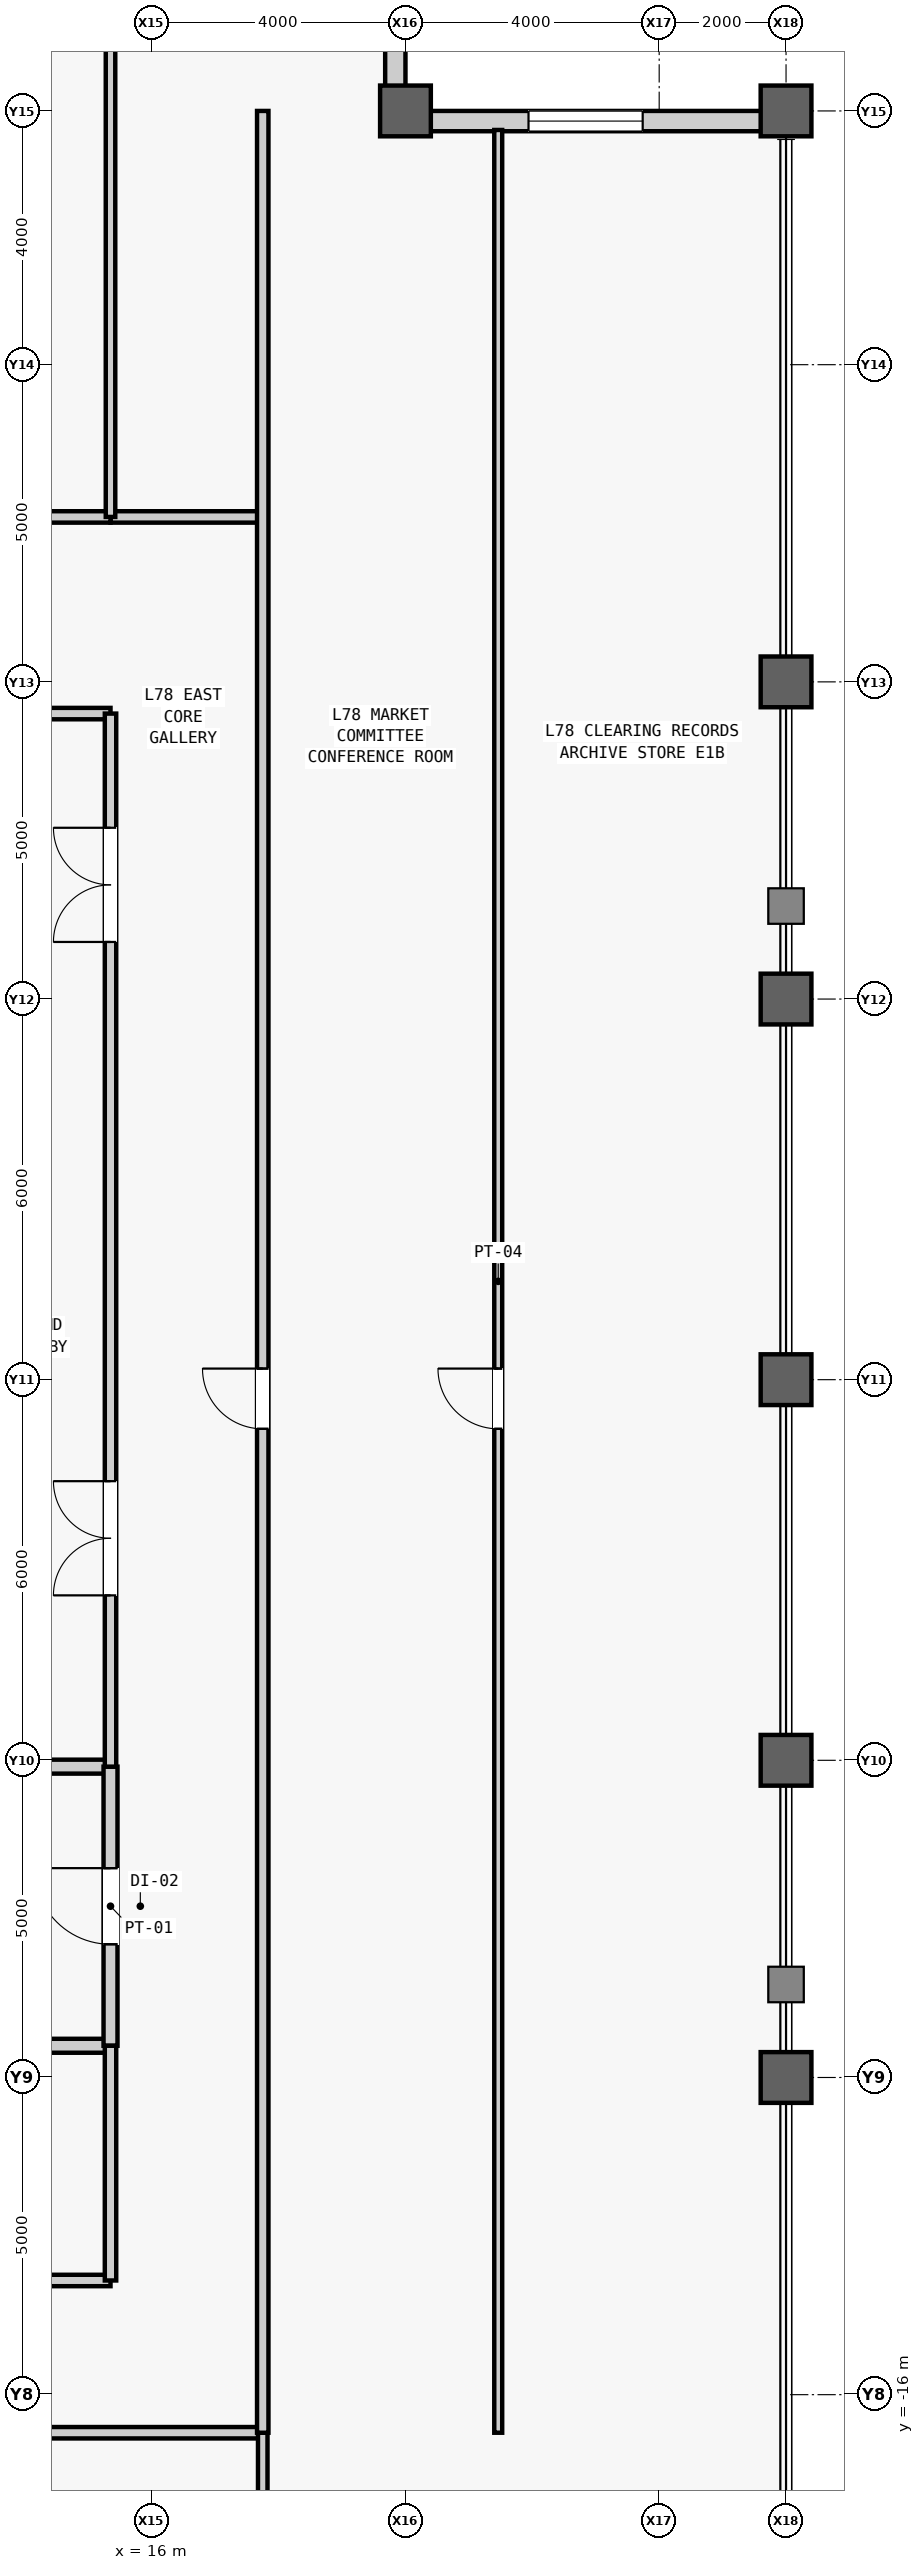
"""IFC4 building model, lengths in metres.
Left out: names, types, materials, properties, quantities, classifications, styles, units other than length and angle.
Written with IfcOpenShell. Run it as: python <this file> out.ifc"""

import sys

from ifc_helpers import new_model, si_unit, direction, frame, frame_2d, origin, origin_2d, place, context, subcontext, project, spatial, rectangle, hollow_rectangle, extrude, source, transform, mapped, element, fill, save


model = new_model("IFC4")
c1 = context("Model", 3, precision=1e-05, world=origin(), true_north=direction((0.0, 1.0)))
c2 = subcontext(c1, "Body", "Model", "MODEL_VIEW")
j1 = project(units=[si_unit("LENGTHUNIT", "METRE"), si_unit("PLANEANGLEUNIT", "RADIAN")], contexts=[c1])
p1 = place(None, origin())
s1 = spatial("IfcSite", under=j1, at=p1, CompositionType="ELEMENT")
p2 = place(p1, origin())
s2 = spatial("IfcBuilding", under=s1, at=p2, CompositionType="ELEMENT")
p3 = place(p2, frame((0.0, 0.0, 330.3)))
s3 = spatial("IfcBuildingStorey", under=s2, at=p3, CompositionType="ELEMENT", Elevation=330.3)
m1 = source(origin(), c2, "Body", "SweptSolid", [
    extrude(hollow_rectangle(XDim=0.8, YDim=0.8, WallThickness=0.045, at=origin_2d()), origin(), (0.0, 0.0, 1.0), 4.0),
])
for number, where, z_axis, x_axis in (
    (1, (20.0, 20.0, 0.0), (0.0, 0.0, 1.0), (1.0, 0.0, 0.0)),
    (2, (26.0, -11.0, 0.0), (0.0, 0.0, 1.0), (1.0, 0.0, 0.0)),
    (3, (26.0, -6.0, 0.0), (0.0, 0.0, 1.0), (1.0, 0.0, 0.0)),
    (4, (26.0, 0.0, 0.0), (0.0, 0.0, 1.0), (1.0, 0.0, 0.0)),
    (5, (26.0, 6.0, 0.0), (0.0, 0.0, 1.0), (1.0, 0.0, 0.0)),
    (6, (26.0, 11.0, 0.0), (0.0, 0.0, 1.0), (1.0, 0.0, 0.0)),
    (7, (26.0, 20.0, 0.0), (0.0, 0.0, 1.0), (1.0, 0.0, 0.0)),
):
    element("IfcColumn", number, at=place(p3, frame(where, z_axis=z_axis, x_axis=x_axis)), inside=s3, PredefinedType="COLUMN", context=c2, shape_type="MappedRepresentation", body=[
        mapped(m1, transform((0.0, 0.0, 0.0), scale=1.0)),
    ])
m2 = source(origin(), c2, "Body", "SweptSolid", [
    extrude(rectangle(XDim=5.68, YDim=0.32, at=frame_2d((2.84, 0.0))), origin(), (0.0, 0.0, 1.0), 3.191),
])
p4 = place(p3, frame((20.0, 19.84, 0.0), z_axis=(0.0, 0.0, 1.0), x_axis=(1.0, 0.0, 0.0)))
e8 = element("IfcWall", 8, at=p4, inside=s3, PredefinedType="STANDARD", context=c2, shape_type="MappedRepresentation", body=[
    mapped(m2, transform((0.0, 0.0, 0.0), scale=1.0)),
])
m3 = source(origin(), c2, "Body", "SweptSolid", [
    extrude(rectangle(XDim=1.8, YDim=2.4, at=frame_2d((0.9, 1.2))), frame((0.0, 0.17, 0.0), z_axis=(0.0, -1.0, 0.0), x_axis=(1.0, 0.0, 0.0)), (0.0, 0.0, 1.0), 0.34),
])
p5 = place(p4, frame((1.94, 0.0, 0.5)))
e9 = element("IfcOpeningElement", 9, at=p5, cuts=e8, PredefinedType="OPENING", context=c2, shape_type="MappedRepresentation", body=[
    mapped(m3, transform((0.0, 0.0, 0.0), scale=1.0)),
])
p6 = place(p3, frame((19.84, 20.0, 0.0), z_axis=(0.0, 0.0, 1.0), x_axis=(0.0, 1.0, 0.0)))
e10 = element("IfcWall", 10, at=p6, inside=s3, PredefinedType="STANDARD", context=c2, shape_type="MappedRepresentation", body=[
    mapped(m2, transform((0.0, 0.0, 0.0), scale=1.0)),
])
p7 = place(p6, frame((1.94, 0.0, 0.5)))
e11 = element("IfcOpeningElement", 11, at=p7, cuts=e10, PredefinedType="OPENING", context=c2, shape_type="MappedRepresentation", body=[
    mapped(m3, transform((0.0, 0.0, 0.0), scale=1.0)),
])
m4 = source(origin(), c2, "Body", "SweptSolid", [
    extrude(rectangle(XDim=4.05, YDim=0.22, at=frame_2d((2.025, 0.0))), origin(), (0.0, 0.0, 1.0), 3.74),
])
p8 = place(p3, frame((11.3, -10.5, 0.0), z_axis=(0.0, 0.0, 1.0), x_axis=(1.0, 0.0, 0.0)))
e12 = element("IfcWall", 12, at=p8, inside=s3, PredefinedType="PARTITIONING", context=c2, shape_type="MappedRepresentation", body=[
    mapped(m4, transform((0.0, 0.0, 0.0), scale=1.0)),
])
m5 = source(origin(), c2, "Body", "SweptSolid", [
    extrude(rectangle(XDim=4.05, YDim=0.22, at=frame_2d((2.025, 0.0))), origin(), (0.0, 0.0, 1.0), 3.124),
])
p9 = place(p3, frame((11.3, -6.1, 0.0), z_axis=(0.0, 0.0, 1.0), x_axis=(1.0, 0.0, 0.0)))
e13 = element("IfcWall", 13, at=p9, inside=s3, PredefinedType="PARTITIONING", context=c2, shape_type="MappedRepresentation", body=[
    mapped(m5, transform((0.0, 0.0, 0.0), scale=1.0)),
])
m6 = source(origin(), c2, "Body", "SweptSolid", [
    extrude(rectangle(XDim=4.4, YDim=0.22, at=frame_2d((2.2, 0.0))), origin(), (0.0, 0.0, 1.0), 3.74),
])
p10 = place(p3, frame((15.35, -10.5, 0.0), z_axis=(0.0, 0.0, 1.0), x_axis=(0.0, 1.0, 0.0)))
e14 = element("IfcWall", 14, at=p10, inside=s3, PredefinedType="PARTITIONING", context=c2, shape_type="MappedRepresentation", body=[
    mapped(m6, transform((0.0, 0.0, 0.0), scale=1.0)),
])
m7 = source(origin(), c2, "Body", "SweptSolid", [
    extrude(rectangle(XDim=1.2, YDim=2.2, at=frame_2d((0.6, 1.1))), frame((0.0, 0.12, 0.0), z_axis=(0.0, -1.0, 0.0), x_axis=(1.0, 0.0, 0.0)), (0.0, 0.0, 1.0), 0.24),
])
p11 = place(p10, frame((1.6, 0.0, 0.0)))
e15 = element("IfcOpeningElement", 15, at=p11, cuts=e14, PredefinedType="OPENING", context=c2, shape_type="MappedRepresentation", body=[
    mapped(m7, transform((0.0, 0.0, 0.0), scale=1.0)),
])
m8 = source(origin(), c2, "Body", "SweptSolid", [
    extrude(rectangle(XDim=4.05, YDim=0.18, at=frame_2d((2.025, 0.0))), origin(), (0.0, 0.0, 1.0), 3.74),
])
p12 = place(p3, frame((11.3, 10.5, 0.0), z_axis=(0.0, 0.0, 1.0), x_axis=(1.0, 0.0, 0.0)))
e16 = element("IfcWall", 16, at=p12, inside=s3, PredefinedType="PARTITIONING", context=c2, shape_type="MappedRepresentation", body=[
    mapped(m8, transform((0.0, 0.0, 0.0), scale=1.0)),
])
m9 = source(origin(), c2, "Body", "SweptSolid", [
    extrude(rectangle(XDim=16.6, YDim=0.18, at=frame_2d((8.3, 0.0))), origin(), (0.0, 0.0, 1.0), 3.74),
])
p13 = place(p3, frame((15.35, -6.1, 0.0), z_axis=(0.0, 0.0, 1.0), x_axis=(0.0, 1.0, 0.0)))
e17 = element("IfcWall", 17, at=p13, inside=s3, PredefinedType="PARTITIONING", context=c2, shape_type="MappedRepresentation", body=[
    mapped(m9, transform((0.0, 0.0, 0.0), scale=1.0)),
])
m10 = source(origin(), c2, "Body", "SweptSolid", [
    extrude(rectangle(XDim=1.8, YDim=2.25, at=frame_2d((0.9, 1.125))), frame((0.0, 0.1, 0.0), z_axis=(0.0, -1.0, 0.0), x_axis=(1.0, 0.0, 0.0)), (0.0, 0.0, 1.0), 0.2),
])
p14 = place(p13, frame((2.7, 0.0, 0.0)))
e18 = element("IfcOpeningElement", 18, at=p14, cuts=e17, PredefinedType="OPENING", context=c2, shape_type="MappedRepresentation", body=[
    mapped(m10, transform((0.0, 0.0, 0.0), scale=1.0)),
])
p15 = place(p13, frame((13.0, 0.0, 0.0)))
e19 = element("IfcOpeningElement", 19, at=p15, cuts=e17, PredefinedType="OPENING", context=c2, shape_type="MappedRepresentation", body=[
    mapped(m10, transform((0.0, 0.0, 0.0), scale=1.0)),
])
m11 = source(origin(), c2, "Body", "SweptSolid", [
    extrude(rectangle(XDim=14.05, YDim=0.18, at=frame_2d((7.025, 0.0))), origin(), (0.0, 0.0, 1.0), 3.74),
])
p16 = place(p3, frame((1.3, -14.2, 0.0), z_axis=(0.0, 0.0, 1.0), x_axis=(1.0, 0.0, 0.0)))
e20 = element("IfcWall", 20, at=p16, inside=s3, PredefinedType="PARTITIONING", context=c2, shape_type="MappedRepresentation", body=[
    mapped(m11, transform((0.0, 0.0, 0.0), scale=1.0)),
])
m12 = source(origin(), c2, "Body", "SweptSolid", [
    extrude(rectangle(XDim=0.9, YDim=2.15, at=frame_2d((0.45, 1.075))), frame((0.0, 0.1, 0.0), z_axis=(0.0, -1.0, 0.0), x_axis=(1.0, 0.0, 0.0)), (0.0, 0.0, 1.0), 0.2),
])
p17 = place(p16, frame((6.25, 0.0, 0.0)))
e21 = element("IfcOpeningElement", 21, at=p17, cuts=e20, PredefinedType="OPENING", context=c2, shape_type="MappedRepresentation", body=[
    mapped(m12, transform((0.0, 0.0, 0.0), scale=1.0)),
])
m13 = source(origin(), c2, "Body", "SweptSolid", [
    extrude(rectangle(XDim=3.7, YDim=0.18, at=frame_2d((1.85, 0.0))), origin(), (0.0, 0.0, 1.0), 3.74),
])
p18 = place(p3, frame((15.35, -14.2, 0.0), z_axis=(0.0, 0.0, 1.0), x_axis=(0.0, 1.0, 0.0)))
e22 = element("IfcWall", 22, at=p18, inside=s3, PredefinedType="PARTITIONING", context=c2, shape_type="MappedRepresentation", body=[
    mapped(m13, transform((0.0, 0.0, 0.0), scale=1.0)),
])
m14 = source(origin(), c2, "Body", "SweptSolid", [
    extrude(rectangle(XDim=2.4, YDim=0.18, at=frame_2d((1.2, 0.0))), origin(), (0.0, 0.0, 1.0), 3.74),
])
p19 = place(p3, frame((15.35, 13.6, 0.0), z_axis=(0.0, 0.0, 1.0), x_axis=(1.0, 0.0, 0.0)))
e23 = element("IfcWall", 23, at=p19, inside=s3, PredefinedType="PARTITIONING", context=c2, shape_type="MappedRepresentation", body=[
    mapped(m14, transform((0.0, 0.0, 0.0), scale=1.0)),
])
m15 = source(origin(), c2, "Body", "SweptSolid", [
    extrude(rectangle(XDim=36.3, YDim=0.18, at=frame_2d((18.15, 0.0))), origin(), (0.0, 0.0, 1.0), 3.74),
])
p20 = place(p3, frame((-18.55, -16.6, 0.0), z_axis=(0.0, 0.0, 1.0), x_axis=(1.0, 0.0, 0.0)))
e24 = element("IfcWall", 24, at=p20, inside=s3, PredefinedType="PARTITIONING", context=c2, shape_type="MappedRepresentation", body=[
    mapped(m15, transform((0.0, 0.0, 0.0), scale=1.0)),
])
m16 = source(origin(), c2, "Body", "SweptSolid", [
    extrude(rectangle(XDim=1.05, YDim=2.2, at=frame_2d((0.525, 1.1))), frame((0.0, 0.1, 0.0), z_axis=(0.0, -1.0, 0.0), x_axis=(1.0, 0.0, 0.0)), (0.0, 0.0, 1.0), 0.2),
])
p21 = place(p20, frame((3.605, 0.0, 0.0)))
e25 = element("IfcOpeningElement", 25, at=p21, cuts=e24, PredefinedType="OPENING", context=c2, shape_type="MappedRepresentation", body=[
    mapped(m16, transform((0.0, 0.0, 0.0), scale=1.0)),
])
p22 = place(p20, frame((11.454, 0.0, 0.0)))
e26 = element("IfcOpeningElement", 26, at=p22, cuts=e24, PredefinedType="OPENING", context=c2, shape_type="MappedRepresentation", body=[
    mapped(m16, transform((0.0, 0.0, 0.0), scale=1.0)),
])
p23 = place(p20, frame((21.255, 0.0, 0.0)))
e27 = element("IfcOpeningElement", 27, at=p23, cuts=e24, PredefinedType="OPENING", context=c2, shape_type="MappedRepresentation", body=[
    mapped(m16, transform((0.0, 0.0, 0.0), scale=1.0)),
])
p24 = place(p20, frame((30.531, 0.0, 0.0)))
e28 = element("IfcOpeningElement", 28, at=p24, cuts=e24, PredefinedType="OPENING", context=c2, shape_type="MappedRepresentation", body=[
    mapped(m16, transform((0.0, 0.0, 0.0), scale=1.0)),
])
m17 = source(origin(), c2, "Body", "SweptSolid", [
    extrude(rectangle(XDim=9.4, YDim=0.15, at=frame_2d((4.7, 0.0))), origin(), (0.0, 0.0, 1.0), 3.74),
])
p25 = place(p3, frame((17.75, -26.0, 0.0), z_axis=(0.0, 0.0, 1.0), x_axis=(0.0, 1.0, 0.0)))
e29 = element("IfcWall", 29, at=p25, inside=s3, PredefinedType="PARTITIONING", context=c2, shape_type="MappedRepresentation", body=[
    mapped(m17, transform((0.0, 0.0, 0.0), scale=1.0)),
])
m18 = source(origin(), c2, "Body", "SweptSolid", [
    extrude(rectangle(XDim=32.75, YDim=0.18, at=frame_2d((16.375, 0.0))), origin(), (0.0, 0.0, 1.0), 3.74),
])
p26 = place(p3, frame((-17.4, 13.6, 0.0), z_axis=(0.0, 0.0, 1.0), x_axis=(1.0, 0.0, 0.0)))
e30 = element("IfcWall", 30, at=p26, inside=s3, PredefinedType="PARTITIONING", context=c2, shape_type="MappedRepresentation", body=[
    mapped(m18, transform((0.0, 0.0, 0.0), scale=1.0)),
])
p27 = place(p26, frame((27.075, 0.0, 0.0)))
e31 = element("IfcOpeningElement", 31, at=p27, cuts=e30, PredefinedType="OPENING", context=c2, shape_type="MappedRepresentation", body=[
    mapped(m16, transform((0.0, 0.0, 0.0), scale=1.0)),
])
m19 = source(origin(), c2, "Body", "SweptSolid", [
    extrude(rectangle(XDim=12.4, YDim=0.15, at=frame_2d((6.2, 0.0))), origin(), (0.0, 0.0, 1.0), 3.74),
])
p28 = place(p3, frame((15.35, 13.6, 0.0), z_axis=(0.0, 0.0, 1.0), x_axis=(0.0, 1.0, 0.0)))
e32 = element("IfcWall", 32, at=p28, inside=s3, PredefinedType="PARTITIONING", context=c2, shape_type="MappedRepresentation", body=[
    mapped(m19, transform((0.0, 0.0, 0.0), scale=1.0)),
])
m20 = source(origin(), c2, "Body", "SweptSolid", [
    extrude(rectangle(XDim=36.3, YDim=0.125, at=frame_2d((18.15, 0.0))), origin(), (0.0, 0.0, 1.0), 3.74),
])
p29 = place(p3, frame((21.462, -16.6, 0.0), z_axis=(0.0, 0.0, 1.0), x_axis=(0.0, 1.0, 0.0)))
e33 = element("IfcWall", 33, at=p29, inside=s3, PredefinedType="PARTITIONING", context=c2, shape_type="MappedRepresentation", body=[
    mapped(m20, transform((0.0, 0.0, 0.0), scale=1.0)),
])
m21 = source(origin(), c2, "Body", "SweptSolid", [
    extrude(rectangle(XDim=0.95, YDim=2.15, at=frame_2d((0.475, 1.075))), frame((0.0, 0.073, 0.0), z_axis=(0.0, -1.0, 0.0), x_axis=(1.0, 0.0, 0.0)), (0.0, 0.0, 1.0), 0.145),
])
p30 = place(p29, frame((15.825, 0.0, 0.0)))
e34 = element("IfcOpeningElement", 34, at=p30, cuts=e33, PredefinedType="OPENING", context=c2, shape_type="MappedRepresentation", body=[
    mapped(m21, transform((0.0, 0.0, 0.0), scale=1.0)),
])
m22 = source(origin(), c2, "Body", "SweptSolid", [
    extrude(rectangle(XDim=36.6, YDim=0.18, at=frame_2d((18.3, 0.0))), origin(), (0.0, 0.0, 1.0), 3.74),
])
p31 = place(p3, frame((17.75, -16.6, 0.0), z_axis=(0.0, 0.0, 1.0), x_axis=(0.0, 1.0, 0.0)))
e35 = element("IfcWall", 35, at=p31, inside=s3, PredefinedType="PARTITIONING", context=c2, shape_type="MappedRepresentation", body=[
    mapped(m22, transform((0.0, 0.0, 0.0), scale=1.0)),
])
m23 = source(origin(), c2, "Body", "SweptSolid", [
    extrude(rectangle(XDim=0.95, YDim=2.15, at=frame_2d((0.475, 1.075))), frame((0.0, 0.1, 0.0), z_axis=(0.0, -1.0, 0.0), x_axis=(1.0, 0.0, 0.0)), (0.0, 0.0, 1.0), 0.2),
])
p32 = place(p31, frame((15.825, 0.0, 0.0)))
e36 = element("IfcOpeningElement", 36, at=p32, cuts=e35, PredefinedType="OPENING", context=c2, shape_type="MappedRepresentation", body=[
    mapped(m23, transform((0.0, 0.0, 0.0), scale=1.0)),
])
m24 = source(origin(), c2, "Body", "SweptSolid", [
    extrude(rectangle(XDim=1.8, YDim=2.4, at=frame_2d((0.9, 1.2))), frame((0.0, 0.03, 0.0), z_axis=(0.0, -1.0, 0.0), x_axis=(1.0, 0.0, 0.0)), (0.0, 0.0, 1.0), 0.06),
])
p33 = place(p5, origin())
e37 = element("IfcWindow", 37, at=p33, inside=s3, PartitioningType="SINGLE_PANEL", PredefinedType="WINDOW", context=c2, shape_type="MappedRepresentation", body=[
    mapped(m24, transform((0.0, 0.0, 0.0), scale=1.0)),
])
fill(e9, e37)
m25 = source(origin(), c2, "Body", "SweptSolid", [
    extrude(rectangle(XDim=1.2, YDim=2.2, at=frame_2d((0.6, 1.1))), frame((0.0, 0.025, 0.0), z_axis=(0.0, -1.0, 0.0), x_axis=(1.0, 0.0, 0.0)), (0.0, 0.0, 1.0), 0.05),
])
p34 = place(p11, origin())
e38 = element("IfcDoor", 38, at=p34, inside=s3, OperationType="SINGLE_SWING_RIGHT", PredefinedType="DOOR", context=c2, shape_type="MappedRepresentation", body=[
    mapped(m25, transform((0.0, 0.0, 0.0), scale=1.0)),
])
fill(e15, e38)
m26 = source(origin(), c2, "Body", "SweptSolid", [
    extrude(rectangle(XDim=1.8, YDim=2.25, at=frame_2d((0.9, 1.125))), frame((0.0, 0.025, 0.0), z_axis=(0.0, -1.0, 0.0), x_axis=(1.0, 0.0, 0.0)), (0.0, 0.0, 1.0), 0.05),
])
p35 = place(p14, origin())
e39 = element("IfcDoor", 39, at=p35, inside=s3, OperationType="SINGLE_SWING_RIGHT", PredefinedType="DOOR", context=c2, shape_type="MappedRepresentation", body=[
    mapped(m26, transform((0.0, 0.0, 0.0), scale=1.0)),
])
fill(e18, e39)
p36 = place(p15, origin())
e40 = element("IfcDoor", 40, at=p36, inside=s3, OperationType="SINGLE_SWING_LEFT", PredefinedType="DOOR", context=c2, shape_type="MappedRepresentation", body=[
    mapped(m26, transform((0.0, 0.0, 0.0), scale=1.0)),
])
fill(e19, e40)
m27 = source(origin(), c2, "Body", "SweptSolid", [
    extrude(rectangle(XDim=0.95, YDim=2.15, at=frame_2d((0.475, 1.075))), frame((0.0, 0.025, 0.0), z_axis=(0.0, -1.0, 0.0), x_axis=(1.0, 0.0, 0.0)), (0.0, 0.0, 1.0), 0.05),
])
p37 = place(p30, origin())
e41 = element("IfcDoor", 41, at=p37, inside=s3, OperationType="SINGLE_SWING_RIGHT", PredefinedType="DOOR", context=c2, shape_type="MappedRepresentation", body=[
    mapped(m27, transform((0.0, 0.0, 0.0), scale=1.0)),
])
fill(e34, e41)
p38 = place(p32, origin())
e42 = element("IfcDoor", 42, at=p38, inside=s3, OperationType="SINGLE_SWING_RIGHT", PredefinedType="DOOR", context=c2, shape_type="MappedRepresentation", body=[
    mapped(m27, transform((0.0, 0.0, 0.0), scale=1.0)),
])
fill(e36, e42)
save(model, sys.argv[1])
